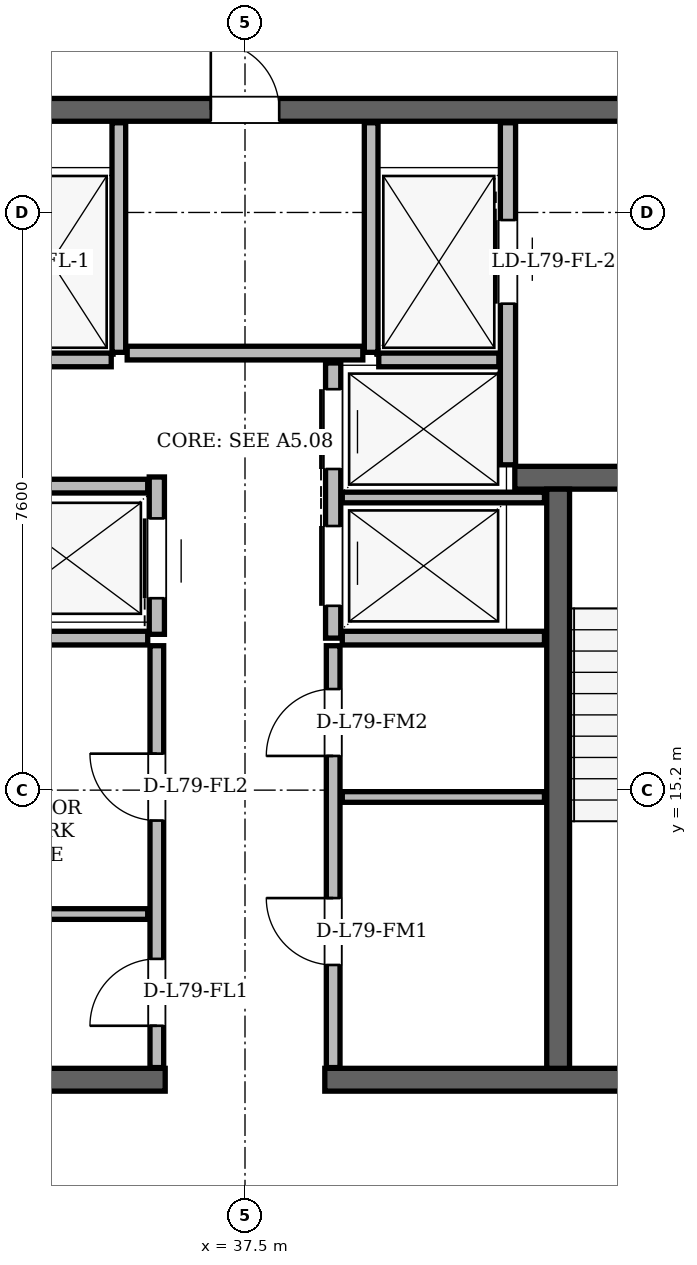
"""IFC4 building model, lengths in metres.
Left out: names, types, materials, properties, quantities, classifications, styles, units other than length and angle.
Written with IfcOpenShell. Run it as: python <this file> out.ifc"""

import sys

from ifc_helpers import new_model, si_unit, direction, frame, frame_2d, origin, place, context, subcontext, project, spatial, rectangle, extrude, element, fill, save


model = new_model("IFC4")
c1 = context("Model", 3, precision=1e-05, world=origin(), true_north=direction((0.0, 1.0)))
c2 = subcontext(c1, "Body", "Model", "MODEL_VIEW")
j1 = project(units=[si_unit("LENGTHUNIT", "METRE"), si_unit("PLANEANGLEUNIT", "RADIAN")], contexts=[c1])
p1 = place(None, origin())
s1 = spatial("IfcSite", under=j1, at=p1, CompositionType="ELEMENT")
p2 = place(p1, origin())
s2 = spatial("IfcBuilding", under=s1, at=p2, CompositionType="ELEMENT")
p3 = place(p2, frame((0.0, 0.0, 301.2)))
s3 = spatial("IfcBuildingStorey", under=s2, at=p3, CompositionType="ELEMENT", Elevation=301.2)
for number, where, z_axis, x_axis in (
    (1, (29.35, 11.39, 0.0), (0.0, 0.0, 1.0), (1.0, 0.0, 0.0)),
    (2, (38.55, 11.39, 0.0), (0.0, 0.0, 1.0), (1.0, 0.0, 0.0)),
):
    element("IfcWall", number, at=place(p3, frame(where, z_axis=z_axis, x_axis=x_axis)), inside=s3, PredefinedType="SHEAR", context=c2, shape_type="SweptSolid", body=[
        extrude(rectangle(XDim=7.1, YDim=0.3, at=frame_2d((3.55, 0.0))), origin(), (0.0, 0.0, 1.0), 3.68),
    ])
p4 = place(p3, frame((29.65, 24.15, 0.0), z_axis=(0.0, 0.0, 1.0), x_axis=(1.0, 0.0, 0.0)))
e3 = element("IfcWall", 3, at=p4, inside=s3, PredefinedType="SHEAR", context=c2, shape_type="SweptSolid", body=[
    extrude(rectangle(XDim=15.7, YDim=0.3, at=frame_2d((7.85, 0.0))), origin(), (0.0, 0.0, 1.0), 3.68),
])
p5 = place(p4, frame((1.7, 0.0, 0.0)))
e4 = element("IfcOpeningElement", 4, at=p5, cuts=e3, PredefinedType="OPENING", context=c2, shape_type="SweptSolid", body=[
    extrude(rectangle(XDim=1.2, YDim=2.2, at=frame_2d((0.6, 1.1))), frame((0.0, 0.15, 0.0), z_axis=(0.0, -1.0, 0.0), x_axis=(1.0, 0.0, 0.0)), (0.0, 0.0, 1.0), 0.3),
])
p6 = place(p4, frame((12.8, 0.0, 0.0)))
e5 = element("IfcOpeningElement", 5, at=p6, cuts=e3, PredefinedType="OPENING", context=c2, shape_type="SweptSolid", body=[
    extrude(rectangle(XDim=1.2, YDim=2.2, at=frame_2d((0.6, 1.1))), frame((0.0, 0.15, 0.0), z_axis=(0.0, -1.0, 0.0), x_axis=(1.0, 0.0, 0.0)), (0.0, 0.0, 1.0), 0.3),
])
p7 = place(p4, frame((7.4, 0.0, 0.0)))
e6 = element("IfcOpeningElement", 6, at=p7, cuts=e3, PredefinedType="OPENING", context=c2, shape_type="SweptSolid", body=[
    extrude(rectangle(XDim=0.9, YDim=2.05, at=frame_2d((0.45, 1.025))), frame((0.0, 0.15, 0.0), z_axis=(0.0, -1.0, 0.0), x_axis=(1.0, 0.0, 0.0)), (0.0, 0.0, 1.0), 0.3),
])
p8 = place(p3, frame((41.05, 19.31, 0.0), z_axis=(0.0, 0.0, 1.0), x_axis=(1.0, 0.0, 0.0)))
e7 = element("IfcWall", 7, at=p8, inside=s3, PredefinedType="SHEAR", context=c2, shape_type="SweptSolid", body=[
    extrude(rectangle(XDim=4.01, YDim=0.3, at=frame_2d((2.005, 0.0))), origin(), (0.0, 0.0, 1.0), 3.68),
])
p9 = place(p8, frame((1.6, 0.0, 0.0)))
e8 = element("IfcOpeningElement", 8, at=p9, cuts=e7, PredefinedType="OPENING", context=c2, shape_type="SweptSolid", body=[
    extrude(rectangle(XDim=1.4, YDim=2.2, at=frame_2d((0.7, 1.1))), frame((0.0, 0.15, 0.0), z_axis=(0.0, -1.0, 0.0), x_axis=(1.0, 0.0, 0.0)), (0.0, 0.0, 1.0), 0.3),
])
p10 = place(p3, frame((41.62, 11.54, 0.0), z_axis=(0.0, 0.0, 1.0), x_axis=(0.0, 1.0, 0.0)))
e9 = element("IfcWall", 9, at=p10, inside=s3, PredefinedType="SHEAR", context=c2, shape_type="SweptSolid", body=[
    extrude(rectangle(XDim=7.62, YDim=0.3, at=frame_2d((3.81, 0.0))), origin(), (0.0, 0.0, 1.0), 3.68),
])
p11 = place(p3, frame((58.261, 10.345, 0.0), z_axis=(0.0, 0.0, 1.0), x_axis=(-0.499999872078, 0.86602547764, 0.0)))
e10 = element("IfcWall", 10, at=p11, inside=s3, PredefinedType="SOLIDWALL", context=c2, shape_type="SweptSolid", body=[
    extrude(rectangle(XDim=37.658, YDim=0.29, at=frame_2d((18.829, 0.0))), origin(), (0.0, 0.0, 1.0), 3.058),
])
p12 = place(p11, frame((8.034, 0.0, 0.0)))
e11 = element("IfcOpeningElement", 11, at=p12, cuts=e10, PredefinedType="OPENING", context=c2, shape_type="SweptSolid", body=[
    extrude(rectangle(XDim=1.5, YDim=2.2, at=frame_2d((0.75, 1.1))), frame((0.0, 0.145, 0.0), z_axis=(0.0, -1.0, 0.0), x_axis=(1.0, 0.0, 0.0)), (0.0, 0.0, 1.0), 0.29),
])
p13 = place(p11, frame((32.618, 0.0, 0.0)))
e12 = element("IfcOpeningElement", 12, at=p13, cuts=e10, PredefinedType="OPENING", context=c2, shape_type="SweptSolid", body=[
    extrude(rectangle(XDim=1.3, YDim=2.2, at=frame_2d((0.65, 1.1))), frame((0.0, 0.145, 0.0), z_axis=(0.0, -1.0, 0.0), x_axis=(1.0, 0.0, 0.0)), (0.0, 0.0, 1.0), 0.29),
])
p14 = place(p11, frame((1.003, 0.0, 0.85)))
e13 = element("IfcOpeningElement", 13, at=p14, cuts=e10, PredefinedType="OPENING", context=c2, shape_type="SweptSolid", body=[
    extrude(rectangle(XDim=1.2, YDim=1.48, at=frame_2d((0.6, 0.74))), frame((0.0, 0.145, 0.0), z_axis=(0.0, -1.0, 0.0), x_axis=(1.0, 0.0, 0.0)), (0.0, 0.0, 1.0), 0.29),
])
p15 = place(p11, frame((13.352, 0.0, 0.85)))
e14 = element("IfcOpeningElement", 14, at=p15, cuts=e10, PredefinedType="OPENING", context=c2, shape_type="SweptSolid", body=[
    extrude(rectangle(XDim=1.6, YDim=1.7, at=frame_2d((0.8, 0.85))), frame((0.0, 0.145, 0.0), z_axis=(0.0, -1.0, 0.0), x_axis=(1.0, 0.0, 0.0)), (0.0, 0.0, 1.0), 0.29),
])
p16 = place(p11, frame((35.063, 0.0, 0.85)))
e15 = element("IfcOpeningElement", 15, at=p16, cuts=e10, PredefinedType="OPENING", context=c2, shape_type="SweptSolid", body=[
    extrude(rectangle(XDim=1.2, YDim=1.48, at=frame_2d((0.6, 0.74))), frame((0.0, 0.145, 0.0), z_axis=(0.0, -1.0, 0.0), x_axis=(1.0, 0.0, 0.0)), (0.0, 0.0, 1.0), 0.29),
])
p17 = place(p11, frame((18.559, 0.0, 0.85)))
e16 = element("IfcOpeningElement", 16, at=p17, cuts=e10, PredefinedType="OPENING", context=c2, shape_type="SweptSolid", body=[
    extrude(rectangle(XDim=3.0, YDim=2.098, at=frame_2d((1.5, 1.049))), frame((0.0, 0.145, 0.0), z_axis=(0.0, -1.0, 0.0), x_axis=(1.0, 0.0, 0.0)), (0.0, 0.0, 1.0), 0.29),
])
p18 = place(p11, frame((24.514, 0.0, 0.85)))
e17 = element("IfcOpeningElement", 17, at=p18, cuts=e10, PredefinedType="OPENING", context=c2, shape_type="SweptSolid", body=[
    extrude(rectangle(XDim=1.2, YDim=1.48, at=frame_2d((0.6, 0.74))), frame((0.0, 0.145, 0.0), z_axis=(0.0, -1.0, 0.0), x_axis=(1.0, 0.0, 0.0)), (0.0, 0.0, 1.0), 0.29),
])
p19 = place(p11, frame((29.78, 0.0, 0.85)))
e18 = element("IfcOpeningElement", 18, at=p19, cuts=e10, PredefinedType="OPENING", context=c2, shape_type="SweptSolid", body=[
    extrude(rectangle(XDim=1.2, YDim=1.48, at=frame_2d((0.6, 0.74))), frame((0.0, 0.145, 0.0), z_axis=(0.0, -1.0, 0.0), x_axis=(1.0, 0.0, 0.0)), (0.0, 0.0, 1.0), 0.29),
])
p20 = place(p3, frame((35.568, 42.958, 0.0), z_axis=(0.0, 0.0, 1.0), x_axis=(-0.499999872078, -0.86602547764, 0.0)))
e19 = element("IfcWall", 19, at=p20, inside=s3, PredefinedType="SOLIDWALL", context=c2, shape_type="SweptSolid", body=[
    extrude(rectangle(XDim=37.658, YDim=0.29, at=frame_2d((18.829, 0.0))), origin(), (0.0, 0.0, 1.0), 3.058),
])
p21 = place(p20, frame((8.034, 0.0, 0.0)))
e20 = element("IfcOpeningElement", 20, at=p21, cuts=e19, PredefinedType="OPENING", context=c2, shape_type="SweptSolid", body=[
    extrude(rectangle(XDim=1.5, YDim=2.2, at=frame_2d((0.75, 1.1))), frame((0.0, 0.145, 0.0), z_axis=(0.0, -1.0, 0.0), x_axis=(1.0, 0.0, 0.0)), (0.0, 0.0, 1.0), 0.29),
])
p22 = place(p20, frame((32.518, 0.0, 0.0)))
e21 = element("IfcOpeningElement", 21, at=p22, cuts=e19, PredefinedType="OPENING", context=c2, shape_type="SweptSolid", body=[
    extrude(rectangle(XDim=1.5, YDim=2.2, at=frame_2d((0.75, 1.1))), frame((0.0, 0.145, 0.0), z_axis=(0.0, -1.0, 0.0), x_axis=(1.0, 0.0, 0.0)), (0.0, 0.0, 1.0), 0.29),
])
p23 = place(p20, frame((27.303, 0.0, 0.85)))
e22 = element("IfcOpeningElement", 22, at=p23, cuts=e19, PredefinedType="OPENING", context=c2, shape_type="SweptSolid", body=[
    extrude(rectangle(XDim=2.2, YDim=1.85, at=frame_2d((1.1, 0.925))), frame((0.0, 0.145, 0.0), z_axis=(0.0, -1.0, 0.0), x_axis=(1.0, 0.0, 0.0)), (0.0, 0.0, 1.0), 0.29),
])
p24 = place(p20, frame((34.437, 0.0, 0.85)))
e23 = element("IfcOpeningElement", 23, at=p24, cuts=e19, PredefinedType="OPENING", context=c2, shape_type="SweptSolid", body=[
    extrude(rectangle(XDim=1.6, YDim=1.7, at=frame_2d((0.8, 0.85))), frame((0.0, 0.145, 0.0), z_axis=(0.0, -1.0, 0.0), x_axis=(1.0, 0.0, 0.0)), (0.0, 0.0, 1.0), 0.29),
])
p25 = place(p20, frame((21.655, 0.0, 0.85)))
e24 = element("IfcOpeningElement", 24, at=p25, cuts=e19, PredefinedType="OPENING", context=c2, shape_type="SweptSolid", body=[
    extrude(rectangle(XDim=1.2, YDim=1.48, at=frame_2d((0.6, 0.74))), frame((0.0, 0.145, 0.0), z_axis=(0.0, -1.0, 0.0), x_axis=(1.0, 0.0, 0.0)), (0.0, 0.0, 1.0), 0.29),
])
p26 = place(p20, frame((23.901, 0.0, 0.85)))
e25 = element("IfcOpeningElement", 25, at=p26, cuts=e19, PredefinedType="OPENING", context=c2, shape_type="SweptSolid", body=[
    extrude(rectangle(XDim=1.4, YDim=1.6, at=frame_2d((0.7, 0.8))), frame((0.0, 0.145, 0.0), z_axis=(0.0, -1.0, 0.0), x_axis=(1.0, 0.0, 0.0)), (0.0, 0.0, 1.0), 0.29),
])
p27 = place(p20, frame((15.246, 0.0, 0.85)))
e26 = element("IfcOpeningElement", 26, at=p27, cuts=e19, PredefinedType="OPENING", context=c2, shape_type="SweptSolid", body=[
    extrude(rectangle(XDim=2.6, YDim=1.95, at=frame_2d((1.3, 0.975))), frame((0.0, 0.145, 0.0), z_axis=(0.0, -1.0, 0.0), x_axis=(1.0, 0.0, 0.0)), (0.0, 0.0, 1.0), 0.29),
])
p28 = place(p20, frame((1.164, 0.0, 0.85)))
e27 = element("IfcOpeningElement", 27, at=p28, cuts=e19, PredefinedType="OPENING", context=c2, shape_type="SweptSolid", body=[
    extrude(rectangle(XDim=1.2, YDim=1.48, at=frame_2d((0.6, 0.74))), frame((0.0, 0.145, 0.0), z_axis=(0.0, -1.0, 0.0), x_axis=(1.0, 0.0, 0.0)), (0.0, 0.0, 1.0), 0.29),
])
p29 = place(p3, frame((35.84, 20.96, 0.0), z_axis=(0.0, 0.0, 1.0), x_axis=(0.0, 1.0, 0.0)))
e28 = element("IfcWall", 28, at=p29, inside=s3, PredefinedType="PARTITIONING", context=c2, shape_type="SweptSolid", body=[
    extrude(rectangle(XDim=3.02, YDim=0.18, at=frame_2d((1.51, 0.0))), origin(), (0.0, 0.0, 1.0), 3.68),
])
p30 = place(p3, frame((34.16, 20.86, 0.0), z_axis=(0.0, 0.0, 1.0), x_axis=(1.0, 0.0, 0.0)))
e29 = element("IfcWall", 29, at=p30, inside=s3, PredefinedType="PARTITIONING", context=c2, shape_type="SweptSolid", body=[
    extrude(rectangle(XDim=1.58, YDim=0.18, at=frame_2d((0.79, 0.0))), origin(), (0.0, 0.0, 1.0), 3.68),
])
p31 = place(p3, frame((40.96, 19.48, 0.0), z_axis=(0.0, 0.0, 1.0), x_axis=(0.0, 1.0, 0.0)))
e30 = element("IfcWall", 30, at=p31, inside=s3, PredefinedType="PARTITIONING", context=c2, shape_type="SweptSolid", body=[
    extrude(rectangle(XDim=4.5, YDim=0.2, at=frame_2d((2.25, 0.0))), origin(), (0.0, 0.0, 1.0), 3.68),
])
p32 = place(p31, frame((2.12, 0.0, 0.0)))
e31 = element("IfcOpeningElement", 31, at=p32, cuts=e30, PredefinedType="OPENING", context=c2, shape_type="SweptSolid", body=[
    extrude(rectangle(XDim=1.1, YDim=2.2, at=frame_2d((0.55, 1.1))), frame((0.0, 0.1, 0.0), z_axis=(0.0, -1.0, 0.0), x_axis=(1.0, 0.0, 0.0)), (0.0, 0.0, 1.0), 0.2),
])
p33 = place(p3, frame((39.16, 20.96, 0.0), z_axis=(0.0, 0.0, 1.0), x_axis=(0.0, 1.0, 0.0)))
e32 = element("IfcWall", 32, at=p33, inside=s3, PredefinedType="PARTITIONING", context=c2, shape_type="SweptSolid", body=[
    extrude(rectangle(XDim=3.02, YDim=0.18, at=frame_2d((1.51, 0.0))), origin(), (0.0, 0.0, 1.0), 3.68),
])
p34 = place(p3, frame((39.26, 20.86, 0.0), z_axis=(0.0, 0.0, 1.0), x_axis=(1.0, 0.0, 0.0)))
e33 = element("IfcWall", 33, at=p34, inside=s3, PredefinedType="PARTITIONING", context=c2, shape_type="SweptSolid", body=[
    extrude(rectangle(XDim=1.58, YDim=0.18, at=frame_2d((0.79, 0.0))), origin(), (0.0, 0.0, 1.0), 3.68),
])
p35 = place(p3, frame((36.34, 17.25, 0.0), z_axis=(0.0, 0.0, 1.0), x_axis=(0.0, 1.0, 0.0)))
e34 = element("IfcWall", 34, at=p35, inside=s3, PredefinedType="PARTITIONING", context=c2, shape_type="SweptSolid", body=[
    extrude(rectangle(XDim=2.07, YDim=0.2, at=frame_2d((1.035, 0.0))), origin(), (0.0, 0.0, 1.0), 3.68),
])
p36 = place(p35, frame((0.475, 0.0, 0.0)))
e35 = element("IfcOpeningElement", 35, at=p36, cuts=e34, PredefinedType="OPENING", context=c2, shape_type="SweptSolid", body=[
    extrude(rectangle(XDim=1.05, YDim=2.15, at=frame_2d((0.525, 1.075))), frame((0.0, 0.1, 0.0), z_axis=(0.0, -1.0, 0.0), x_axis=(1.0, 0.0, 0.0)), (0.0, 0.0, 1.0), 0.2),
])
p37 = place(p3, frame((33.95, 19.2, 0.0), z_axis=(0.0, 0.0, 1.0), x_axis=(1.0, 0.0, 0.0)))
e36 = element("IfcWall", 36, at=p37, inside=s3, PredefinedType="PARTITIONING", context=c2, shape_type="SweptSolid", body=[
    extrude(rectangle(XDim=2.27, YDim=0.18, at=frame_2d((1.135, 0.0))), origin(), (0.0, 0.0, 1.0), 3.68),
])
p38 = place(p3, frame((33.56, 17.2, 0.0), z_axis=(0.0, 0.0, 1.0), x_axis=(1.0, 0.0, 0.0)))
e37 = element("IfcWall", 37, at=p38, inside=s3, PredefinedType="PARTITIONING", context=c2, shape_type="SweptSolid", body=[
    extrude(rectangle(XDim=2.66, YDim=0.18, at=frame_2d((1.33, 0.0))), origin(), (0.0, 0.0, 1.0), 3.68),
])
p39 = place(p3, frame((36.34, 11.55, 0.0), z_axis=(0.0, 0.0, 1.0), x_axis=(0.0, 1.0, 0.0)))
e38 = element("IfcWall", 38, at=p39, inside=s3, PredefinedType="PARTITIONING", context=c2, shape_type="SweptSolid", body=[
    extrude(rectangle(XDim=5.55, YDim=0.18, at=frame_2d((2.775, 0.0))), origin(), (0.0, 0.0, 1.0), 3.68),
])
p40 = place(p39, frame((0.55, 0.0, 0.0)))
e39 = element("IfcOpeningElement", 39, at=p40, cuts=e38, PredefinedType="OPENING", context=c2, shape_type="SweptSolid", body=[
    extrude(rectangle(XDim=0.88, YDim=2.08, at=frame_2d((0.44, 1.04))), frame((0.0, 0.09, 0.0), z_axis=(0.0, -1.0, 0.0), x_axis=(1.0, 0.0, 0.0)), (0.0, 0.0, 1.0), 0.18),
])
p41 = place(p39, frame((3.25, 0.0, 0.0)))
e40 = element("IfcOpeningElement", 40, at=p41, cuts=e38, PredefinedType="OPENING", context=c2, shape_type="SweptSolid", body=[
    extrude(rectangle(XDim=0.88, YDim=2.08, at=frame_2d((0.44, 1.04))), frame((0.0, 0.09, 0.0), z_axis=(0.0, -1.0, 0.0), x_axis=(1.0, 0.0, 0.0)), (0.0, 0.0, 1.0), 0.18),
])
p42 = place(p3, frame((33.56, 13.57, 0.0), z_axis=(0.0, 0.0, 1.0), x_axis=(1.0, 0.0, 0.0)))
e41 = element("IfcWall", 41, at=p42, inside=s3, PredefinedType="PARTITIONING", context=c2, shape_type="SweptSolid", body=[
    extrude(rectangle(XDim=2.66, YDim=0.14, at=frame_2d((1.33, 0.0))), origin(), (0.0, 0.0, 1.0), 3.68),
])
p43 = place(p3, frame((38.66, 17.2, 0.0), z_axis=(0.0, 0.0, 1.0), x_axis=(0.0, 1.0, 0.0)))
e42 = element("IfcWall", 42, at=p43, inside=s3, PredefinedType="PARTITIONING", context=c2, shape_type="SweptSolid", body=[
    extrude(rectangle(XDim=3.62, YDim=0.2, at=frame_2d((1.81, 0.0))), origin(), (0.0, 0.0, 1.0), 3.68),
])
p44 = place(p43, frame((0.425, 0.0, 0.0)))
e43 = element("IfcOpeningElement", 43, at=p44, cuts=e42, PredefinedType="OPENING", context=c2, shape_type="SweptSolid", body=[
    extrude(rectangle(XDim=1.05, YDim=2.15, at=frame_2d((0.525, 1.075))), frame((0.0, 0.1, 0.0), z_axis=(0.0, -1.0, 0.0), x_axis=(1.0, 0.0, 0.0)), (0.0, 0.0, 1.0), 0.2),
])
p45 = place(p43, frame((2.225, 0.0, 0.0)))
e44 = element("IfcOpeningElement", 44, at=p45, cuts=e42, PredefinedType="OPENING", context=c2, shape_type="SweptSolid", body=[
    extrude(rectangle(XDim=1.05, YDim=2.15, at=frame_2d((0.525, 1.075))), frame((0.0, 0.1, 0.0), z_axis=(0.0, -1.0, 0.0), x_axis=(1.0, 0.0, 0.0)), (0.0, 0.0, 1.0), 0.2),
])
p46 = place(p3, frame((38.78, 17.2, 0.0), z_axis=(0.0, 0.0, 1.0), x_axis=(1.0, 0.0, 0.0)))
e45 = element("IfcWall", 45, at=p46, inside=s3, PredefinedType="PARTITIONING", context=c2, shape_type="SweptSolid", body=[
    extrude(rectangle(XDim=2.66, YDim=0.18, at=frame_2d((1.33, 0.0))), origin(), (0.0, 0.0, 1.0), 3.68),
])
p47 = place(p3, frame((38.78, 19.05, 0.0), z_axis=(0.0, 0.0, 1.0), x_axis=(1.0, 0.0, 0.0)))
e46 = element("IfcWall", 46, at=p47, inside=s3, PredefinedType="PARTITIONING", context=c2, shape_type="SweptSolid", body=[
    extrude(rectangle(XDim=2.66, YDim=0.14, at=frame_2d((1.33, 0.0))), origin(), (0.0, 0.0, 1.0), 3.68),
])
p48 = place(p3, frame((38.66, 11.55, 0.0), z_axis=(0.0, 0.0, 1.0), x_axis=(0.0, 1.0, 0.0)))
e47 = element("IfcWall", 47, at=p48, inside=s3, PredefinedType="PARTITIONING", context=c2, shape_type="SweptSolid", body=[
    extrude(rectangle(XDim=5.55, YDim=0.18, at=frame_2d((2.775, 0.0))), origin(), (0.0, 0.0, 1.0), 3.68),
])
p49 = place(p48, frame((1.35, 0.0, 0.0)))
e48 = element("IfcOpeningElement", 48, at=p49, cuts=e47, PredefinedType="OPENING", context=c2, shape_type="SweptSolid", body=[
    extrude(rectangle(XDim=0.88, YDim=2.08, at=frame_2d((0.44, 1.04))), frame((0.0, 0.09, 0.0), z_axis=(0.0, -1.0, 0.0), x_axis=(1.0, 0.0, 0.0)), (0.0, 0.0, 1.0), 0.18),
])
p50 = place(p48, frame((4.1, 0.0, 0.0)))
e49 = element("IfcOpeningElement", 49, at=p50, cuts=e47, PredefinedType="OPENING", context=c2, shape_type="SweptSolid", body=[
    extrude(rectangle(XDim=0.88, YDim=2.08, at=frame_2d((0.44, 1.04))), frame((0.0, 0.09, 0.0), z_axis=(0.0, -1.0, 0.0), x_axis=(1.0, 0.0, 0.0)), (0.0, 0.0, 1.0), 0.18),
])
p51 = place(p3, frame((38.78, 15.11, 0.0), z_axis=(0.0, 0.0, 1.0), x_axis=(1.0, 0.0, 0.0)))
e50 = element("IfcWall", 50, at=p51, inside=s3, PredefinedType="PARTITIONING", context=c2, shape_type="SweptSolid", body=[
    extrude(rectangle(XDim=2.66, YDim=0.14, at=frame_2d((1.33, 0.0))), origin(), (0.0, 0.0, 1.0), 3.68),
])
p52 = place(p3, frame((35.95, 20.95, 0.0), z_axis=(0.0, 0.0, 1.0), x_axis=(1.0, 0.0, 0.0)))
e51 = element("IfcWall", 51, at=p52, inside=s3, PredefinedType="PARTITIONING", context=c2, shape_type="SweptSolid", body=[
    extrude(rectangle(XDim=3.1, YDim=0.18, at=frame_2d((1.55, 0.0))), origin(), (0.0, 0.0, 1.0), 3.68),
])
p53 = place(p40, origin())
e52 = element("IfcDoor", 52, at=p53, inside=s3, OperationType="SINGLE_SWING_LEFT", PredefinedType="DOOR", context=c2, shape_type="SweptSolid", body=[
    extrude(rectangle(XDim=0.88, YDim=2.08, at=frame_2d((0.44, 1.04))), frame((0.0, 0.025, 0.0), z_axis=(0.0, -1.0, 0.0), x_axis=(1.0, 0.0, 0.0)), (0.0, 0.0, 1.0), 0.05),
])
fill(e39, e52)
p54 = place(p41, origin())
e53 = element("IfcDoor", 53, at=p54, inside=s3, OperationType="SINGLE_SWING_RIGHT", PredefinedType="DOOR", context=c2, shape_type="SweptSolid", body=[
    extrude(rectangle(XDim=0.88, YDim=2.08, at=frame_2d((0.44, 1.04))), frame((0.0, 0.025, 0.0), z_axis=(0.0, -1.0, 0.0), x_axis=(1.0, 0.0, 0.0)), (0.0, 0.0, 1.0), 0.05),
])
fill(e40, e53)
p55 = place(p49, origin())
e54 = element("IfcDoor", 54, at=p55, inside=s3, OperationType="SINGLE_SWING_RIGHT", PredefinedType="DOOR", context=c2, shape_type="SweptSolid", body=[
    extrude(rectangle(XDim=0.88, YDim=2.08, at=frame_2d((0.44, 1.04))), frame((0.0, 0.025, 0.0), z_axis=(0.0, -1.0, 0.0), x_axis=(1.0, 0.0, 0.0)), (0.0, 0.0, 1.0), 0.05),
])
fill(e48, e54)
p56 = place(p50, origin())
e55 = element("IfcDoor", 55, at=p56, inside=s3, OperationType="SINGLE_SWING_LEFT", PredefinedType="DOOR", context=c2, shape_type="SweptSolid", body=[
    extrude(rectangle(XDim=0.88, YDim=2.08, at=frame_2d((0.44, 1.04))), frame((0.0, 0.025, 0.0), z_axis=(0.0, -1.0, 0.0), x_axis=(1.0, 0.0, 0.0)), (0.0, 0.0, 1.0), 0.05),
])
fill(e49, e55)
p57 = place(p32, origin())
e56 = element("IfcDoor", 56, at=p57, inside=s3, OperationType="SLIDING_TO_RIGHT", PredefinedType="DOOR", context=c2, shape_type="SweptSolid", body=[
    extrude(rectangle(XDim=1.1, YDim=2.2, at=frame_2d((0.55, 1.1))), frame((0.0, 0.025, 0.0), z_axis=(0.0, -1.0, 0.0), x_axis=(1.0, 0.0, 0.0)), (0.0, 0.0, 1.0), 0.05),
])
fill(e31, e56)
p58 = place(p36, origin())
e57 = element("IfcDoor", 57, at=p58, inside=s3, OperationType="SLIDING_TO_LEFT", PredefinedType="DOOR", context=c2, shape_type="SweptSolid", body=[
    extrude(rectangle(XDim=1.05, YDim=2.15, at=frame_2d((0.525, 1.075))), frame((0.0, 0.025, 0.0), z_axis=(0.0, -1.0, 0.0), x_axis=(1.0, 0.0, 0.0)), (0.0, 0.0, 1.0), 0.05),
])
fill(e35, e57)
p59 = place(p44, origin())
e58 = element("IfcDoor", 58, at=p59, inside=s3, OperationType="SLIDING_TO_RIGHT", PredefinedType="DOOR", context=c2, shape_type="SweptSolid", body=[
    extrude(rectangle(XDim=1.05, YDim=2.15, at=frame_2d((0.525, 1.075))), frame((0.0, 0.025, 0.0), z_axis=(0.0, -1.0, 0.0), x_axis=(1.0, 0.0, 0.0)), (0.0, 0.0, 1.0), 0.05),
])
fill(e43, e58)
p60 = place(p45, origin())
e59 = element("IfcDoor", 59, at=p60, inside=s3, OperationType="SLIDING_TO_LEFT", PredefinedType="DOOR", context=c2, shape_type="SweptSolid", body=[
    extrude(rectangle(XDim=1.05, YDim=2.15, at=frame_2d((0.525, 1.075))), frame((0.0, 0.025, 0.0), z_axis=(0.0, -1.0, 0.0), x_axis=(1.0, 0.0, 0.0)), (0.0, 0.0, 1.0), 0.05),
])
fill(e44, e59)
p61 = place(p7, origin())
e60 = element("IfcDoor", 60, at=p61, inside=s3, OperationType="SINGLE_SWING_LEFT", PredefinedType="DOOR", context=c2, shape_type="SweptSolid", body=[
    extrude(rectangle(XDim=0.9, YDim=2.05, at=frame_2d((0.45, 1.025))), frame((0.0, 0.025, 0.0), z_axis=(0.0, -1.0, 0.0), x_axis=(1.0, 0.0, 0.0)), (0.0, 0.0, 1.0), 0.05),
])
fill(e6, e60)
save(model, sys.argv[1])
